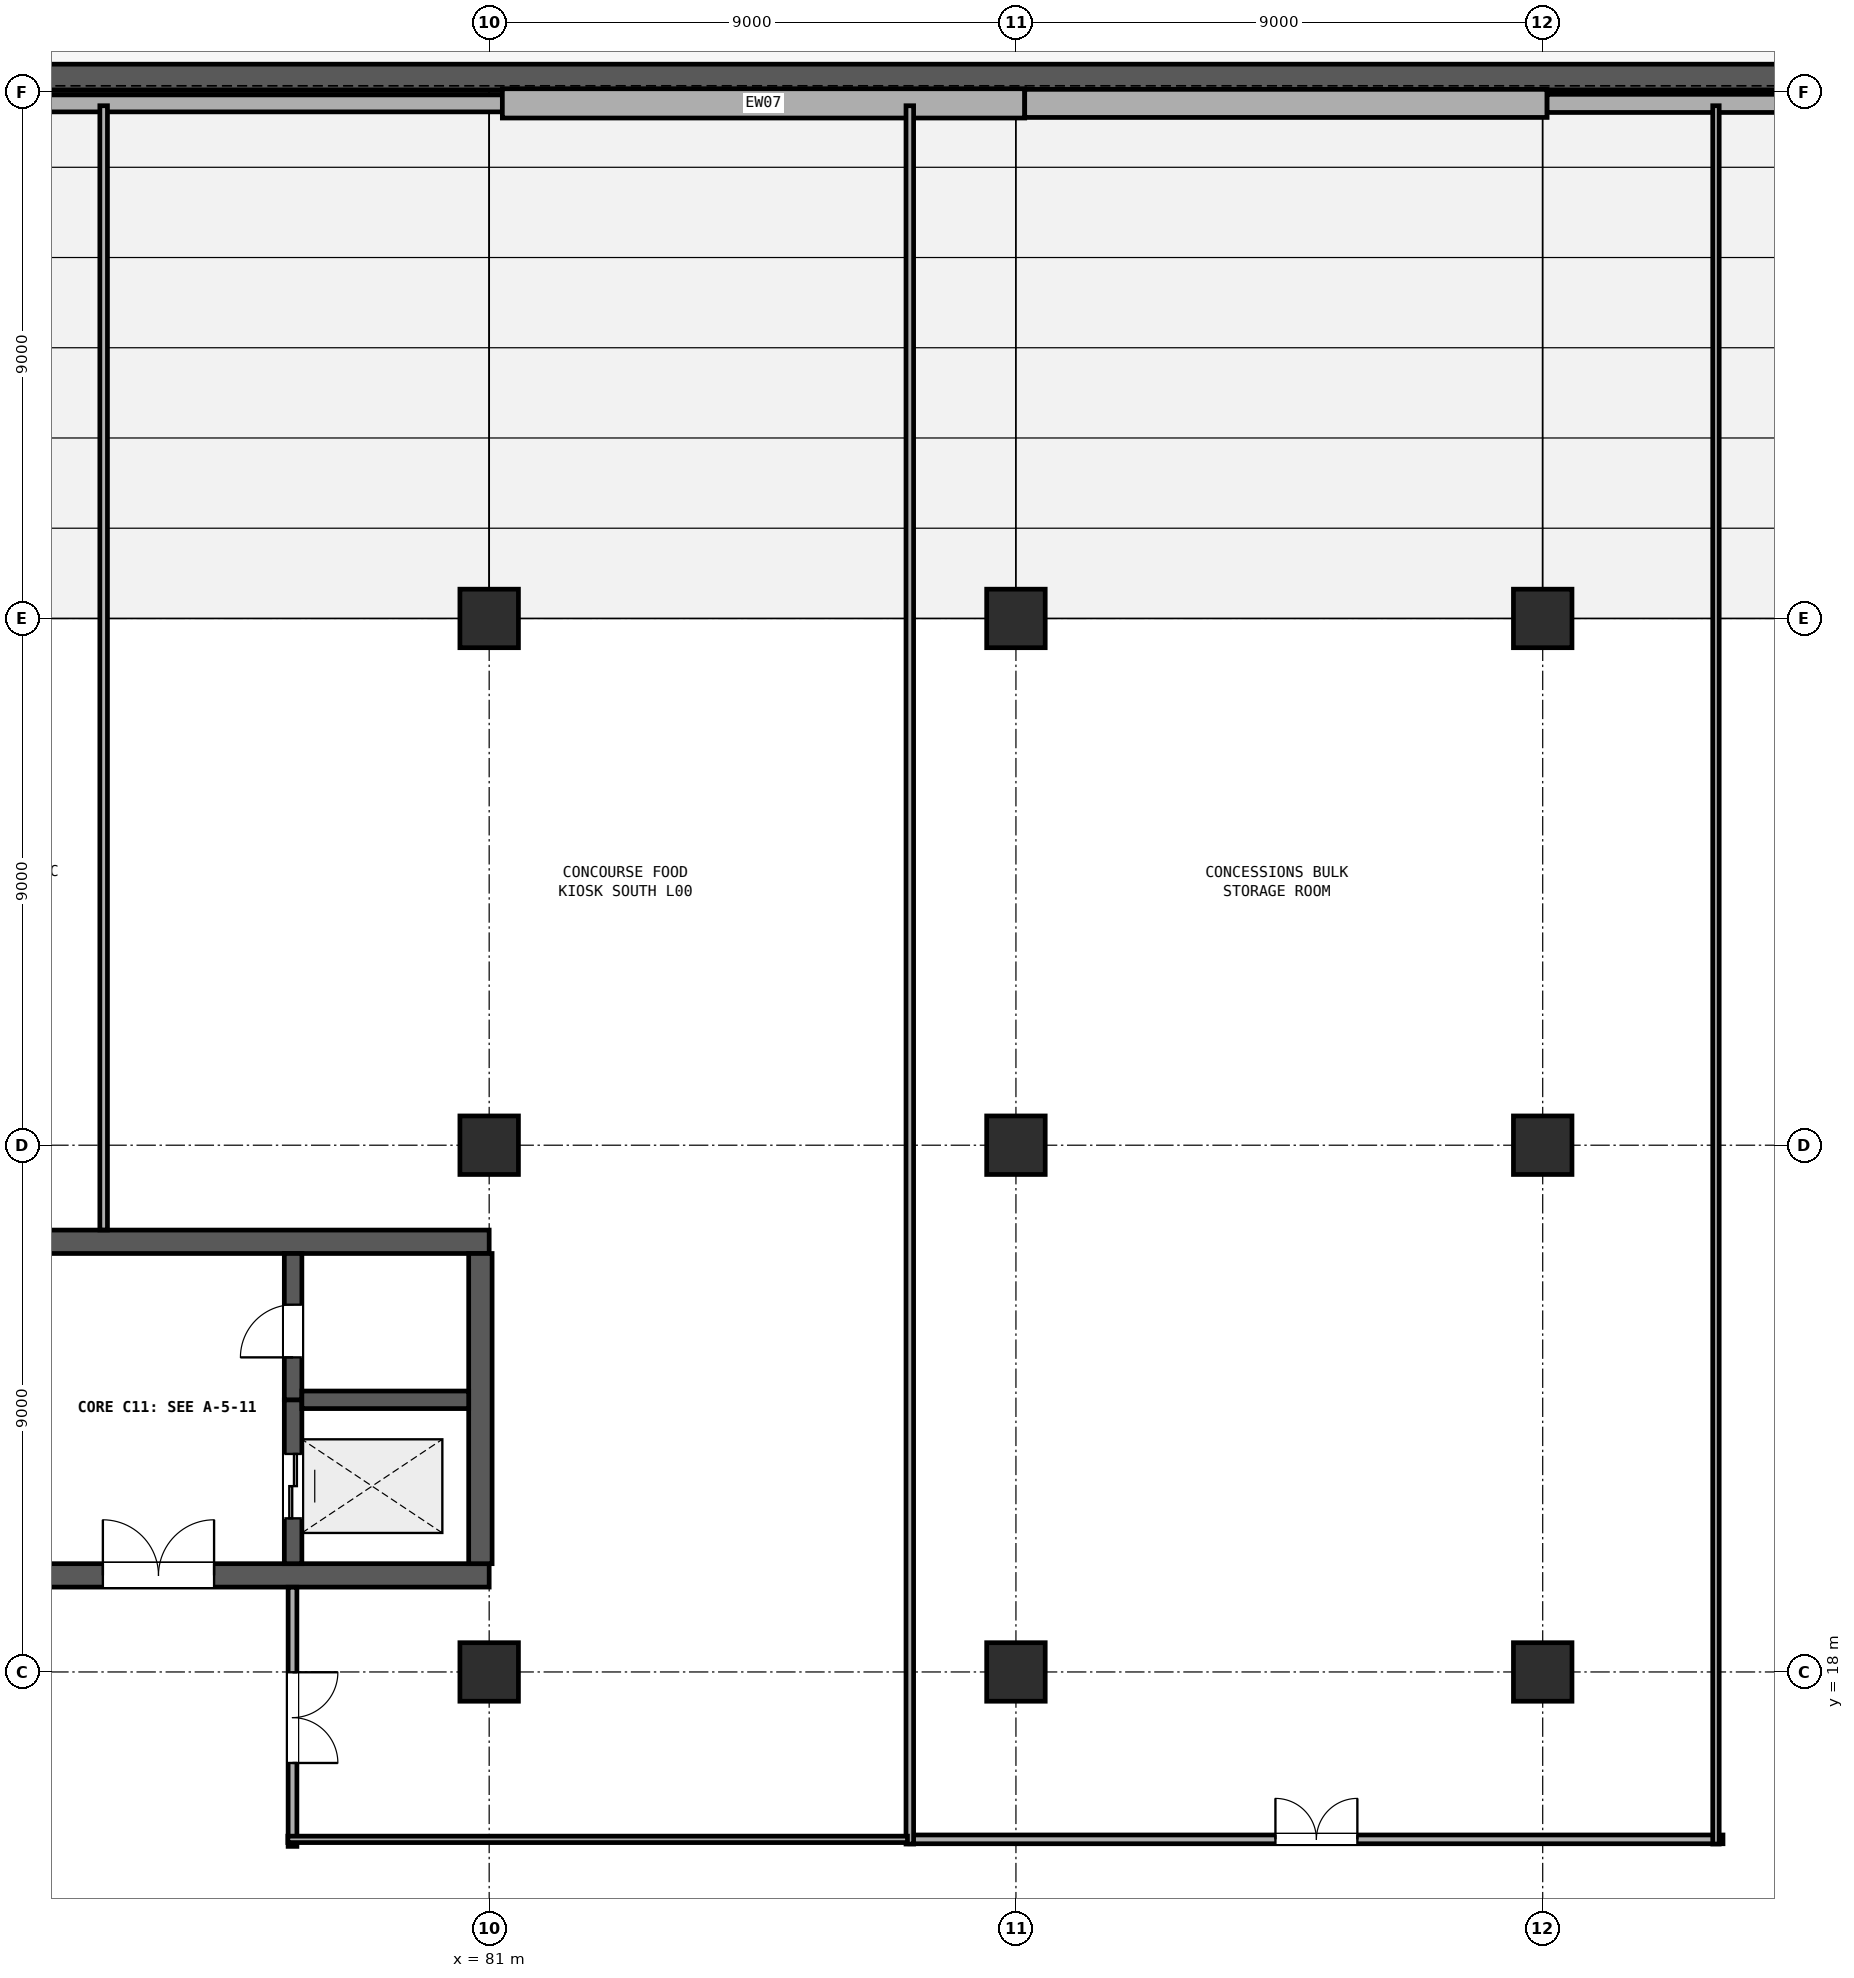
"""IFC4 building model, lengths in metres.
Left out: names, types, materials, properties, quantities, classifications, styles, units other than length and angle.
Written with IfcOpenShell. Run it as: python <this file> out.ifc"""

import sys

from ifc_helpers import new_model, si_unit, direction, frame, frame_2d, origin, origin_2d, place, context, subcontext, project, spatial, rectangle, extrude, element, fill, save


model = new_model("IFC4")
c1 = context("Model", 3, precision=1e-05, world=origin(), true_north=direction((0.0, 1.0)))
c2 = subcontext(c1, "Body", "Model", "MODEL_VIEW")
j1 = project(units=[si_unit("LENGTHUNIT", "METRE"), si_unit("PLANEANGLEUNIT", "RADIAN")], contexts=[c1])
p1 = place(None, origin())
s1 = spatial("IfcSite", under=j1, at=p1, CompositionType="ELEMENT")
p2 = place(p1, origin())
s2 = spatial("IfcBuilding", under=s1, at=p2, CompositionType="ELEMENT")
p3 = place(p2, origin())
s3 = spatial("IfcBuildingStorey", under=s2, at=p3, CompositionType="ELEMENT", Elevation=0.0)
for number, where, z_axis, x_axis in (
    (1, (81.0, 18.0, 0.0), (0.0, 0.0, 1.0), (1.0, 0.0, 0.0)),
    (2, (81.0, 27.0, 0.0), (0.0, 0.0, 1.0), (1.0, 0.0, 0.0)),
    (3, (81.0, 36.0, 0.0), (0.0, 0.0, 1.0), (1.0, 0.0, 0.0)),
    (4, (90.0, 18.0, 0.0), (0.0, 0.0, 1.0), (1.0, 0.0, 0.0)),
    (5, (90.0, 27.0, 0.0), (0.0, 0.0, 1.0), (1.0, 0.0, 0.0)),
    (6, (90.0, 36.0, 0.0), (0.0, 0.0, 1.0), (1.0, 0.0, 0.0)),
    (7, (99.0, 18.0, 0.0), (0.0, 0.0, 1.0), (1.0, 0.0, 0.0)),
    (8, (99.0, 27.0, 0.0), (0.0, 0.0, 1.0), (1.0, 0.0, 0.0)),
    (9, (99.0, 36.0, 0.0), (0.0, 0.0, 1.0), (1.0, 0.0, 0.0)),
):
    element("IfcColumn", number, at=place(p3, frame(where, z_axis=z_axis, x_axis=x_axis)), inside=s3, PredefinedType="COLUMN", context=c2, shape_type="SweptSolid", body=[
        extrude(rectangle(XDim=1.0, YDim=1.0, at=origin_2d()), origin(), (0.0, 0.0, 1.0), 4.8),
    ])
p4 = place(p3, frame((55.1, 45.25, 0.0), z_axis=(0.0, 0.0, 1.0), x_axis=(1.0, 0.0, 0.0)))
e10 = element("IfcWall", 10, at=p4, inside=s3, PredefinedType="SOLIDWALL", context=c2, shape_type="SweptSolid", body=[
    extrude(rectangle(XDim=105.8, YDim=0.44, at=frame_2d((52.9, 0.0))), origin(), (0.0, 0.0, 1.0), 0.9),
])
p5 = place(p3, frame((63.0, 19.65, 0.0), z_axis=(0.0, 0.0, 1.0), x_axis=(1.0, 0.0, 0.0)))
e11 = element("IfcWall", 11, at=p5, inside=s3, PredefinedType="SHEAR", context=c2, shape_type="SweptSolid", body=[
    extrude(rectangle(XDim=18.0, YDim=0.4, at=frame_2d((9.0, 0.0))), origin(), (0.0, 0.0, 1.0), 4.5),
])
p6 = place(p5, frame((11.4, 0.0, 0.0)))
e12 = element("IfcOpeningElement", 12, at=p6, cuts=e11, PredefinedType="OPENING", context=c2, shape_type="SweptSolid", body=[
    extrude(rectangle(XDim=1.9, YDim=2.25, at=frame_2d((0.95, 1.125))), frame((0.0, 0.21, 0.0), z_axis=(0.0, -1.0, 0.0), x_axis=(1.0, 0.0, 0.0)), (0.0, 0.0, 1.0), 0.42),
])
p7 = place(p3, frame((81.0, 25.35, 0.0), z_axis=(0.0, 0.0, 1.0), x_axis=(-1.0, 0.0, 0.0)))
e13 = element("IfcWall", 13, at=p7, inside=s3, PredefinedType="SHEAR", context=c2, shape_type="SweptSolid", body=[
    extrude(rectangle(XDim=18.0, YDim=0.4, at=frame_2d((9.0, 0.0))), origin(), (0.0, 0.0, 1.0), 4.5),
])
p8 = place(p3, frame((80.85, 19.85, 0.0), z_axis=(0.0, 0.0, 1.0), x_axis=(0.0, 1.0, 0.0)))
e14 = element("IfcWall", 14, at=p8, inside=s3, PredefinedType="SHEAR", context=c2, shape_type="SweptSolid", body=[
    extrude(rectangle(XDim=5.3, YDim=0.4, at=frame_2d((2.65, 0.0))), origin(), (0.0, 0.0, 1.0), 4.5),
])
p9 = place(p3, frame((77.65, 19.85, 0.0), z_axis=(0.0, 0.0, 1.0), x_axis=(0.0, 1.0, 0.0)))
e15 = element("IfcWall", 15, at=p9, inside=s3, PredefinedType="SHEAR", context=c2, shape_type="SweptSolid", body=[
    extrude(rectangle(XDim=2.8, YDim=0.3, at=frame_2d((1.4, 0.0))), origin(), (0.0, 0.0, 1.0), 4.5),
])
p10 = place(p9, frame((0.775, 0.0, 0.0)))
e16 = element("IfcOpeningElement", 16, at=p10, cuts=e15, PredefinedType="OPENING", context=c2, shape_type="SweptSolid", body=[
    extrude(rectangle(XDim=1.1, YDim=2.1, at=frame_2d((0.55, 1.05))), frame((0.0, 0.16, 0.0), z_axis=(0.0, -1.0, 0.0), x_axis=(1.0, 0.0, 0.0)), (0.0, 0.0, 1.0), 0.32),
])
p11 = place(p3, frame((77.65, 22.65, 0.0), z_axis=(0.0, 0.0, 1.0), x_axis=(0.0, 1.0, 0.0)))
e17 = element("IfcWall", 17, at=p11, inside=s3, PredefinedType="SHEAR", context=c2, shape_type="SweptSolid", body=[
    extrude(rectangle(XDim=2.5, YDim=0.3, at=frame_2d((1.25, 0.0))), origin(), (0.0, 0.0, 1.0), 4.5),
])
p12 = place(p11, frame((0.725, 0.0, 0.0)))
e18 = element("IfcOpeningElement", 18, at=p12, cuts=e17, PredefinedType="OPENING", context=c2, shape_type="SweptSolid", body=[
    extrude(rectangle(XDim=0.9, YDim=2.1, at=frame_2d((0.45, 1.05))), frame((0.0, 0.16, 0.0), z_axis=(0.0, -1.0, 0.0), x_axis=(1.0, 0.0, 0.0)), (0.0, 0.0, 1.0), 0.32),
])
p13 = place(p3, frame((77.8, 22.65, 0.0), z_axis=(0.0, 0.0, 1.0), x_axis=(1.0, 0.0, 0.0)))
e19 = element("IfcWall", 19, at=p13, inside=s3, PredefinedType="SHEAR", context=c2, shape_type="SweptSolid", body=[
    extrude(rectangle(XDim=2.85, YDim=0.3, at=frame_2d((1.425, 0.0))), origin(), (0.0, 0.0, 1.0), 4.5),
])
p14 = place(p3, frame((72.3, 44.8, 0.0), z_axis=(0.0, 0.0, 1.0), x_axis=(1.0, 0.0, 0.0)))
e20 = element("IfcWall", 20, at=p14, inside=s3, PredefinedType="SOLIDWALL", context=c2, shape_type="SweptSolid", body=[
    extrude(rectangle(XDim=8.925, YDim=0.29, at=frame_2d((4.462, 0.0))), origin(), (0.0, 0.0, 1.0), 3.28),
])
p15 = place(p3, frame((81.225, 44.8, 0.0), z_axis=(0.0, 0.0, 1.0), x_axis=(1.0, 0.0, 0.0)))
e21 = element("IfcWall", 21, at=p15, inside=s3, PredefinedType="SOLIDWALL", context=c2, shape_type="SweptSolid", body=[
    extrude(rectangle(XDim=8.925, YDim=0.5, at=frame_2d((4.462, 0.0))), origin(), (0.0, 0.0, 1.0), 3.28),
])
p16 = place(p3, frame((90.15, 44.8, 0.0), z_axis=(0.0, 0.0, 1.0), x_axis=(1.0, 0.0, 0.0)))
e22 = element("IfcWall", 22, at=p16, inside=s3, PredefinedType="SOLIDWALL", context=c2, shape_type="SweptSolid", body=[
    extrude(rectangle(XDim=8.925, YDim=0.48, at=frame_2d((4.462, 0.0))), origin(), (0.0, 0.0, 1.0), 3.28),
])
p17 = place(p3, frame((99.075, 44.8, 0.0), z_axis=(0.0, 0.0, 1.0), x_axis=(1.0, 0.0, 0.0)))
e23 = element("IfcWall", 23, at=p17, inside=s3, PredefinedType="SOLIDWALL", context=c2, shape_type="SweptSolid", body=[
    extrude(rectangle(XDim=8.925, YDim=0.31, at=frame_2d((4.462, 0.0))), origin(), (0.0, 0.0, 1.0), 3.28),
])
p18 = place(p3, frame((88.187, 15.14, 0.0), z_axis=(0.0, 0.0, 1.0), x_axis=(1.0, 0.0, 0.0)))
e24 = element("IfcWall", 24, at=p18, inside=s3, PredefinedType="PARTITIONING", context=c2, shape_type="SweptSolid", body=[
    extrude(rectangle(XDim=13.893, YDim=0.15, at=frame_2d((6.947, 0.0))), origin(), (0.0, 0.0, 1.0), 3.28),
])
p19 = place(p18, frame((6.247, 0.0, 0.0)))
e25 = element("IfcOpeningElement", 25, at=p19, cuts=e24, PredefinedType="OPENING", context=c2, shape_type="SweptSolid", body=[
    extrude(rectangle(XDim=1.4, YDim=2.15, at=frame_2d((0.7, 1.075))), frame((0.0, 0.085, 0.0), z_axis=(0.0, -1.0, 0.0), x_axis=(1.0, 0.0, 0.0)), (0.0, 0.0, 1.0), 0.17),
])
p20 = place(p3, frame((88.187, 15.06, 0.0), z_axis=(0.0, 0.0, 1.0), x_axis=(0.0, 1.0, 0.0)))
e26 = element("IfcWall", 26, at=p20, inside=s3, PredefinedType="PARTITIONING", context=c2, shape_type="SweptSolid", body=[
    extrude(rectangle(XDim=29.7, YDim=0.13, at=frame_2d((14.85, 0.0))), origin(), (0.0, 0.0, 1.0), 3.28),
])
p21 = place(p3, frame((101.96, 44.76, 0.0), z_axis=(0.0, 0.0, 1.0), x_axis=(0.0, -1.0, 0.0)))
e27 = element("IfcWall", 27, at=p21, inside=s3, PredefinedType="PARTITIONING", context=c2, shape_type="SweptSolid", body=[
    extrude(rectangle(XDim=29.7, YDim=0.11, at=frame_2d((14.85, 0.0))), origin(), (0.0, 0.0, 1.0), 3.28),
])
p22 = place(p3, frame((77.64, 19.448, 0.0), z_axis=(0.0, 0.0, 1.0), x_axis=(0.0, -1.0, 0.0)))
e28 = element("IfcWall", 28, at=p22, inside=s3, PredefinedType="PARTITIONING", context=c2, shape_type="SweptSolid", body=[
    extrude(rectangle(XDim=4.428, YDim=0.15, at=frame_2d((2.214, 0.0))), origin(), (0.0, 0.0, 1.0), 3.28),
])
p23 = place(p22, frame((1.453, 0.0, 0.0)))
e29 = element("IfcOpeningElement", 29, at=p23, cuts=e28, PredefinedType="OPENING", context=c2, shape_type="SweptSolid", body=[
    extrude(rectangle(XDim=1.55, YDim=2.2, at=frame_2d((0.775, 1.1))), frame((0.0, 0.085, 0.0), z_axis=(0.0, -1.0, 0.0), x_axis=(1.0, 0.0, 0.0)), (0.0, 0.0, 1.0), 0.17),
])
p24 = place(p3, frame((74.413, 25.552, 0.0), z_axis=(0.0, 0.0, 1.0), x_axis=(0.0, 1.0, 0.0)))
e30 = element("IfcWall", 30, at=p24, inside=s3, PredefinedType="PARTITIONING", context=c2, shape_type="SweptSolid", body=[
    extrude(rectangle(XDim=19.208, YDim=0.13, at=frame_2d((9.604, 0.0))), origin(), (0.0, 0.0, 1.0), 3.28),
])
p25 = place(p3, frame((88.147, 15.14, 0.0), z_axis=(0.0, 0.0, 1.0), x_axis=(-1.0, 0.0, 0.0)))
e31 = element("IfcWall", 31, at=p25, inside=s3, PredefinedType="PARTITIONING", context=c2, shape_type="SweptSolid", body=[
    extrude(rectangle(XDim=10.587, YDim=0.11, at=frame_2d((5.293, 0.0))), origin(), (0.0, 0.0, 1.0), 3.28),
])
p26 = place(p12, origin())
e32 = element("IfcDoor", 32, at=p26, inside=s3, OperationType="SINGLE_SWING_LEFT", PredefinedType="DOOR", context=c2, shape_type="SweptSolid", body=[
    extrude(rectangle(XDim=0.9, YDim=2.1, at=frame_2d((0.45, 1.05))), frame((0.0, 0.025, 0.0), z_axis=(0.0, -1.0, 0.0), x_axis=(1.0, 0.0, 0.0)), (0.0, 0.0, 1.0), 0.05),
])
fill(e18, e32)
p27 = place(p10, origin())
e33 = element("IfcDoor", 33, at=p27, inside=s3, OperationType="DOUBLE_DOOR_SLIDING", PredefinedType="DOOR", context=c2, shape_type="SweptSolid", body=[
    extrude(rectangle(XDim=1.1, YDim=2.1, at=frame_2d((0.55, 1.05))), frame((0.0, 0.025, 0.0), z_axis=(0.0, -1.0, 0.0), x_axis=(1.0, 0.0, 0.0)), (0.0, 0.0, 1.0), 0.05),
])
fill(e16, e33)
p28 = place(p6, origin())
e34 = element("IfcDoor", 34, at=p28, inside=s3, OperationType="DOUBLE_DOOR_SINGLE_SWING", PredefinedType="DOOR", context=c2, shape_type="SweptSolid", body=[
    extrude(rectangle(XDim=1.9, YDim=2.25, at=frame_2d((0.95, 1.125))), frame((0.0, 0.025, 0.0), z_axis=(0.0, -1.0, 0.0), x_axis=(1.0, 0.0, 0.0)), (0.0, 0.0, 1.0), 0.05),
])
fill(e12, e34)
p29 = place(p19, origin())
e35 = element("IfcDoor", 35, at=p29, inside=s3, OperationType="DOUBLE_DOOR_SINGLE_SWING", PredefinedType="DOOR", context=c2, shape_type="SweptSolid", body=[
    extrude(rectangle(XDim=1.4, YDim=2.15, at=frame_2d((0.7, 1.075))), frame((0.0, 0.025, 0.0), z_axis=(0.0, -1.0, 0.0), x_axis=(1.0, 0.0, 0.0)), (0.0, 0.0, 1.0), 0.05),
])
fill(e25, e35)
p30 = place(p23, origin())
e36 = element("IfcDoor", 36, at=p30, inside=s3, OperationType="DOUBLE_DOOR_SINGLE_SWING", PredefinedType="DOOR", context=c2, shape_type="SweptSolid", body=[
    extrude(rectangle(XDim=1.55, YDim=2.2, at=frame_2d((0.775, 1.1))), frame((0.0, 0.025, 0.0), z_axis=(0.0, -1.0, 0.0), x_axis=(1.0, 0.0, 0.0)), (0.0, 0.0, 1.0), 0.05),
])
fill(e29, e36)
save(model, sys.argv[1])
